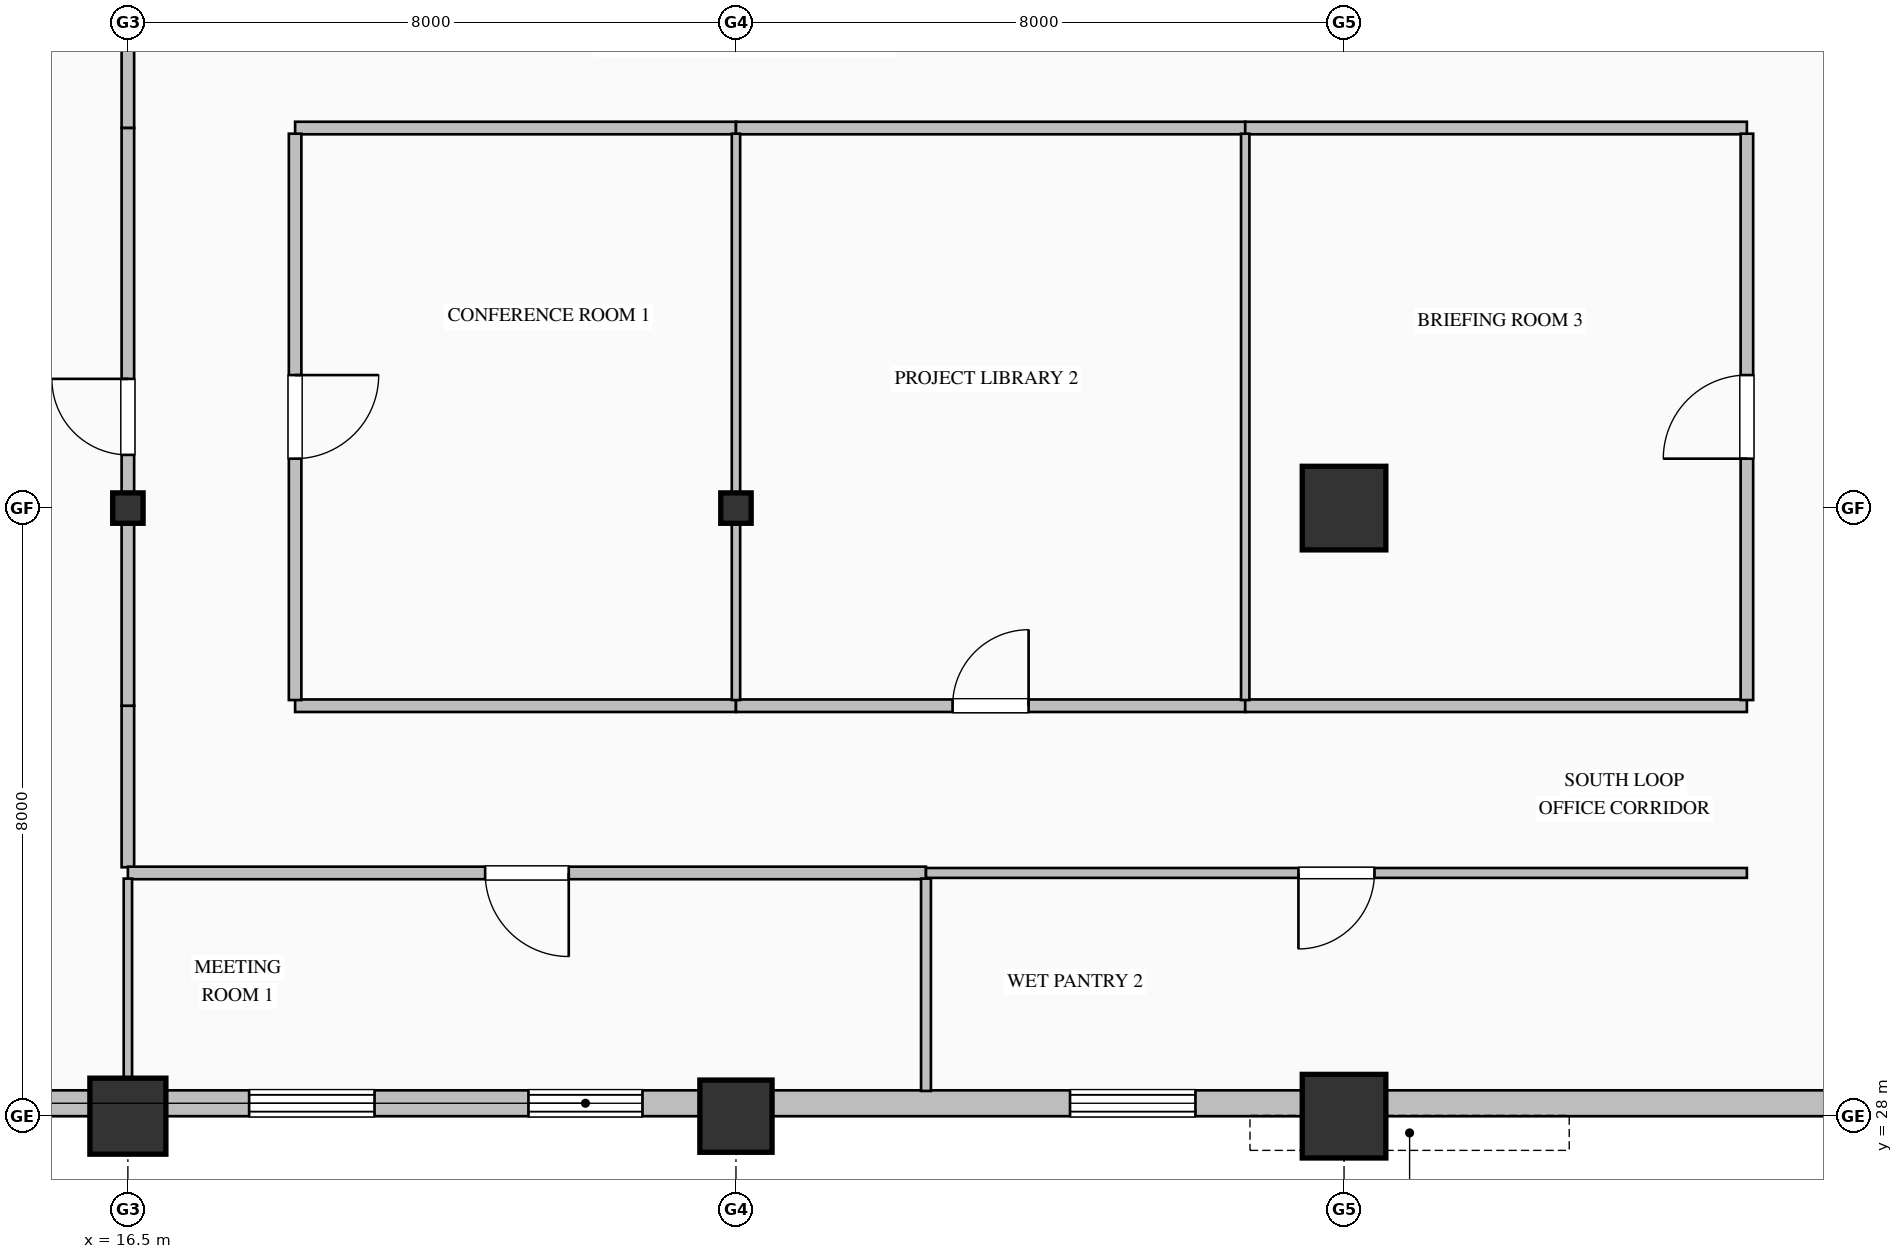
"""IFC4 building model, lengths in metres.
Left out: names, types, materials, properties, quantities, classifications, styles, units other than length and angle.
Written with IfcOpenShell. Run it as: python <this file> out.ifc"""

import sys

from ifc_helpers import new_model, si_unit, direction, frame, frame_2d, origin, origin_2d, place, context, subcontext, project, spatial, rectangle, hollow_rectangle, hollow_circle, i_section, extrude, element, fill, save


model = new_model("IFC4")
c1 = context("Model", 3, precision=1e-05, world=origin(), true_north=direction((0.0, 1.0)))
c2 = subcontext(c1, "Body", "Model", "MODEL_VIEW")
j1 = project(units=[si_unit("LENGTHUNIT", "METRE"), si_unit("PLANEANGLEUNIT", "RADIAN")], contexts=[c1])
p1 = place(None, origin())
s1 = spatial("IfcSite", under=j1, at=p1, CompositionType="ELEMENT")
p2 = place(p1, origin())
s2 = spatial("IfcBuilding", under=s1, at=p2, CompositionType="ELEMENT")
p3 = place(p2, frame((0.0, 0.0, 131.0)))
s3 = spatial("IfcBuildingStorey", under=s2, at=p3, CompositionType="ELEMENT", Elevation=131.0)
p4 = place(p3, frame((16.5, 28.0, 0.0), z_axis=(0.0, 0.0, 1.0), x_axis=(1.0, 0.0, 0.0)))
e1 = element("IfcColumn", 1, at=p4, inside=s3, PredefinedType="COLUMN", context=c2, shape_type="SweptSolid", body=[
    extrude(hollow_circle(Radius=0.5, WallThickness=0.036, at=origin_2d()), origin(), (0.0, 0.0, 1.0), 4.0),
])
p5 = place(p3, frame((16.5, 36.0, 0.0), z_axis=(0.0, 0.0, 1.0), x_axis=(1.0, 0.0, 0.0)))
e2 = element("IfcColumn", 2, at=p5, inside=s3, PredefinedType="COLUMN", context=c2, shape_type="SweptSolid", body=[
    extrude(i_section(OverallWidth=0.4, OverallDepth=0.4, WebThickness=0.013, FlangeThickness=0.021, FilletRadius=0.022, at=origin_2d()), origin(), (0.0, 0.0, 1.0), 4.0),
])
p6 = place(p3, frame((24.5, 28.0, 0.0), z_axis=(0.0, 0.0, 1.0), x_axis=(1.0, 0.0, 0.0)))
e3 = element("IfcColumn", 3, at=p6, inside=s3, PredefinedType="COLUMN", context=c2, shape_type="SweptSolid", body=[
    extrude(hollow_rectangle(XDim=0.95, YDim=0.95, WallThickness=0.036, at=origin_2d()), origin(), (0.0, 0.0, 1.0), 4.0),
])
p7 = place(p3, frame((24.5, 36.0, 0.0), z_axis=(0.0, 0.0, 1.0), x_axis=(1.0, 0.0, 0.0)))
e4 = element("IfcColumn", 4, at=p7, inside=s3, PredefinedType="COLUMN", context=c2, shape_type="SweptSolid", body=[
    extrude(i_section(OverallWidth=0.4, OverallDepth=0.4, WebThickness=0.013, FlangeThickness=0.021, FilletRadius=0.022, at=origin_2d()), origin(), (0.0, 0.0, 1.0), 4.0),
])
for number, where, z_axis, x_axis in (
    (5, (32.5, 28.0, 0.0), (0.0, 0.0, 1.0), (1.0, 0.0, 0.0)),
    (6, (32.5, 36.0, 0.0), (0.0, 0.0, 1.0), (1.0, 0.0, 0.0)),
):
    element("IfcColumn", number, at=place(p3, frame(where, z_axis=z_axis, x_axis=x_axis)), inside=s3, PredefinedType="COLUMN", context=c2, shape_type="SweptSolid", body=[
        extrude(hollow_rectangle(XDim=1.1, YDim=1.1, WallThickness=0.04, at=origin_2d()), origin(), (0.0, 0.0, 1.0), 4.0),
    ])
p8 = place(p3, frame((40.52, 28.17, 0.0), z_axis=(0.0, 0.0, 1.0), x_axis=(-1.0, 0.0, 0.0)))
e7 = element("IfcWall", 7, at=p8, inside=s3, PredefinedType="SOLIDWALL", context=c2, shape_type="SweptSolid", body=[
    extrude(rectangle(XDim=27.52, YDim=0.34, at=frame_2d((13.76, 0.0))), origin(), (0.0, 0.0, 1.0), 3.165),
])
p9 = place(p8, frame((9.975, 0.0, 0.85)))
e8 = element("IfcOpeningElement", 8, at=p9, cuts=e7, PredefinedType="OPENING", context=c2, shape_type="SweptSolid", body=[
    extrude(rectangle(XDim=1.65, YDim=1.95, at=frame_2d((0.825, 0.975))), frame((0.0, 0.18, 0.0), z_axis=(0.0, -1.0, 0.0), x_axis=(1.0, 0.0, 0.0)), (0.0, 0.0, 1.0), 0.36),
])
p10 = place(p8, frame((17.25, 0.0, 0.85)))
e9 = element("IfcOpeningElement", 9, at=p10, cuts=e7, PredefinedType="OPENING", context=c2, shape_type="SweptSolid", body=[
    extrude(rectangle(XDim=1.5, YDim=1.95, at=frame_2d((0.75, 0.975))), frame((0.0, 0.18, 0.0), z_axis=(0.0, -1.0, 0.0), x_axis=(1.0, 0.0, 0.0)), (0.0, 0.0, 1.0), 0.36),
])
p11 = place(p8, frame((20.775, 0.0, 0.85)))
e10 = element("IfcOpeningElement", 10, at=p11, cuts=e7, PredefinedType="OPENING", context=c2, shape_type="SweptSolid", body=[
    extrude(rectangle(XDim=1.65, YDim=1.95, at=frame_2d((0.825, 0.975))), frame((0.0, 0.18, 0.0), z_axis=(0.0, -1.0, 0.0), x_axis=(1.0, 0.0, 0.0)), (0.0, 0.0, 1.0), 0.36),
])
p12 = place(p3, frame((18.7, 33.4, 0.0), z_axis=(0.0, 0.0, 1.0), x_axis=(1.0, 0.0, 0.0)))
e11 = element("IfcWall", 11, at=p12, inside=s3, PredefinedType="PARTITIONING", context=c2, shape_type="SweptSolid", body=[
    extrude(rectangle(XDim=5.8, YDim=0.165, at=frame_2d((2.9, 0.0))), origin(), (0.0, 0.0, 1.0), 3.765),
])
p13 = place(p3, frame((24.5, 33.4, 0.0), z_axis=(0.0, 0.0, 1.0), x_axis=(1.0, 0.0, 0.0)))
e12 = element("IfcWall", 12, at=p13, inside=s3, PredefinedType="PARTITIONING", context=c2, shape_type="SweptSolid", body=[
    extrude(rectangle(XDim=6.7, YDim=0.165, at=frame_2d((3.35, 0.0))), origin(), (0.0, 0.0, 1.0), 3.765),
])
p14 = place(p13, frame((2.85, 0.0, 0.0)))
e13 = element("IfcOpeningElement", 13, at=p14, cuts=e12, PredefinedType="OPENING", context=c2, shape_type="SweptSolid", body=[
    extrude(rectangle(XDim=1.0, YDim=2.15, at=frame_2d((0.5, 1.075))), frame((0.0, 0.093, 0.0), z_axis=(0.0, -1.0, 0.0), x_axis=(1.0, 0.0, 0.0)), (0.0, 0.0, 1.0), 0.185),
])
p15 = place(p3, frame((31.2, 33.4, 0.0), z_axis=(0.0, 0.0, 1.0), x_axis=(1.0, 0.0, 0.0)))
e14 = element("IfcWall", 14, at=p15, inside=s3, PredefinedType="PARTITIONING", context=c2, shape_type="SweptSolid", body=[
    extrude(rectangle(XDim=6.6, YDim=0.165, at=frame_2d((3.3, 0.0))), origin(), (0.0, 0.0, 1.0), 3.765),
])
p16 = place(p3, frame((16.5, 31.274, 0.0), z_axis=(0.0, 0.0, 1.0), x_axis=(0.0, 1.0, 0.0)))
e15 = element("IfcWall", 15, at=p16, inside=s3, PredefinedType="PARTITIONING", context=c2, shape_type="SweptSolid", body=[
    extrude(rectangle(XDim=2.125, YDim=0.165, at=frame_2d((1.063, 0.0))), origin(), (0.0, 0.0, 1.0), 3.157),
])
p17 = place(p3, frame((27.0, 31.2, 0.0), z_axis=(0.0, 0.0, 1.0), x_axis=(-1.0, 0.0, 0.0)))
e16 = element("IfcWall", 16, at=p17, inside=s3, PredefinedType="PARTITIONING", context=c2, shape_type="SweptSolid", body=[
    extrude(rectangle(XDim=10.5, YDim=0.165, at=frame_2d((5.25, 0.0))), origin(), (0.0, 0.0, 1.0), 3.765),
])
p18 = place(p17, frame((4.7, 0.0, 0.0)))
e17 = element("IfcOpeningElement", 17, at=p18, cuts=e16, PredefinedType="OPENING", context=c2, shape_type="SweptSolid", body=[
    extrude(rectangle(XDim=1.1, YDim=2.2, at=frame_2d((0.55, 1.1))), frame((0.0, 0.093, 0.0), z_axis=(0.0, -1.0, 0.0), x_axis=(1.0, 0.0, 0.0)), (0.0, 0.0, 1.0), 0.185),
])
p19 = place(p3, frame((37.8, 31.2, 0.0), z_axis=(0.0, 0.0, 1.0), x_axis=(-1.0, 0.0, 0.0)))
e18 = element("IfcWall", 18, at=p19, inside=s3, PredefinedType="PARTITIONING", context=c2, shape_type="SweptSolid", body=[
    extrude(rectangle(XDim=10.8, YDim=0.13, at=frame_2d((5.4, 0.0))), origin(), (0.0, 0.0, 1.0), 3.765),
])
p20 = place(p19, frame((4.9, 0.0, 0.0)))
e19 = element("IfcOpeningElement", 19, at=p20, cuts=e18, PredefinedType="OPENING", context=c2, shape_type="SweptSolid", body=[
    extrude(rectangle(XDim=1.0, YDim=2.15, at=frame_2d((0.5, 1.075))), frame((0.0, 0.075, 0.0), z_axis=(0.0, -1.0, 0.0), x_axis=(1.0, 0.0, 0.0)), (0.0, 0.0, 1.0), 0.15),
])
p21 = place(p3, frame((24.5, 41.0, 0.0), z_axis=(0.0, 0.0, 1.0), x_axis=(-1.0, 0.0, 0.0)))
e20 = element("IfcWall", 20, at=p21, inside=s3, PredefinedType="PARTITIONING", context=c2, shape_type="SweptSolid", body=[
    extrude(rectangle(XDim=5.8, YDim=0.165, at=frame_2d((2.9, 0.0))), origin(), (0.0, 0.0, 1.0), 3.765),
])
p22 = place(p3, frame((31.2, 41.0, 0.0), z_axis=(0.0, 0.0, 1.0), x_axis=(-1.0, 0.0, 0.0)))
e21 = element("IfcWall", 21, at=p22, inside=s3, PredefinedType="PARTITIONING", context=c2, shape_type="SweptSolid", body=[
    extrude(rectangle(XDim=6.7, YDim=0.165, at=frame_2d((3.35, 0.0))), origin(), (0.0, 0.0, 1.0), 3.765),
])
p23 = place(p3, frame((37.8, 41.0, 0.0), z_axis=(0.0, 0.0, 1.0), x_axis=(-1.0, 0.0, 0.0)))
e22 = element("IfcWall", 22, at=p23, inside=s3, PredefinedType="PARTITIONING", context=c2, shape_type="SweptSolid", body=[
    extrude(rectangle(XDim=6.6, YDim=0.165, at=frame_2d((3.3, 0.0))), origin(), (0.0, 0.0, 1.0), 3.765),
])
p24 = place(p3, frame((16.5, 41.0, 0.0), z_axis=(0.0, 0.0, 1.0), x_axis=(0.0, 1.0, 0.0)))
e23 = element("IfcWall", 23, at=p24, inside=s3, PredefinedType="PARTITIONING", context=c2, shape_type="SweptSolid", body=[
    extrude(rectangle(XDim=2.125, YDim=0.165, at=frame_2d((1.063, 0.0))), origin(), (0.0, 0.0, 1.0), 3.157),
])
p25 = place(p3, frame((18.7, 40.926, 0.0), z_axis=(0.0, 0.0, 1.0), x_axis=(0.0, -1.0, 0.0)))
e24 = element("IfcWall", 24, at=p25, inside=s3, PredefinedType="PARTITIONING", context=c2, shape_type="SweptSolid", body=[
    extrude(rectangle(XDim=7.451, YDim=0.165, at=frame_2d((3.726, 0.0))), origin(), (0.0, 0.0, 1.0), 3.765),
])
p26 = place(p25, frame((3.176, 0.0, 0.0)))
e25 = element("IfcOpeningElement", 25, at=p26, cuts=e24, PredefinedType="OPENING", context=c2, shape_type="SweptSolid", body=[
    extrude(rectangle(XDim=1.1, YDim=2.2, at=frame_2d((0.55, 1.1))), frame((0.0, 0.093, 0.0), z_axis=(0.0, -1.0, 0.0), x_axis=(1.0, 0.0, 0.0)), (0.0, 0.0, 1.0), 0.185),
])
p27 = place(p3, frame((16.5, 33.4, 0.0), z_axis=(0.0, 0.0, 1.0), x_axis=(0.0, 1.0, 0.0)))
e26 = element("IfcWall", 26, at=p27, inside=s3, PredefinedType="PARTITIONING", context=c2, shape_type="SweptSolid", body=[
    extrude(rectangle(XDim=7.6, YDim=0.165, at=frame_2d((3.8, 0.0))), origin(), (0.0, 0.0, 1.0), 3.157),
])
p28 = place(p27, frame((3.3, 0.0, 0.0)))
e27 = element("IfcOpeningElement", 27, at=p28, cuts=e26, PredefinedType="OPENING", context=c2, shape_type="SweptSolid", body=[
    extrude(rectangle(XDim=1.0, YDim=2.15, at=frame_2d((0.5, 1.075))), frame((0.0, 0.093, 0.0), z_axis=(0.0, -1.0, 0.0), x_axis=(1.0, 0.0, 0.0)), (0.0, 0.0, 1.0), 0.185),
])
p29 = place(p3, frame((37.8, 33.475, 0.0), z_axis=(0.0, 0.0, 1.0), x_axis=(0.0, 1.0, 0.0)))
e28 = element("IfcWall", 28, at=p29, inside=s3, PredefinedType="PARTITIONING", context=c2, shape_type="SweptSolid", body=[
    extrude(rectangle(XDim=7.451, YDim=0.165, at=frame_2d((3.726, 0.0))), origin(), (0.0, 0.0, 1.0), 3.765),
])
p30 = place(p29, frame((3.176, 0.0, 0.0)))
e29 = element("IfcOpeningElement", 29, at=p30, cuts=e28, PredefinedType="OPENING", context=c2, shape_type="SweptSolid", body=[
    extrude(rectangle(XDim=1.1, YDim=2.2, at=frame_2d((0.55, 1.1))), frame((0.0, 0.093, 0.0), z_axis=(0.0, -1.0, 0.0), x_axis=(1.0, 0.0, 0.0)), (0.0, 0.0, 1.0), 0.185),
])
p31 = place(p3, frame((24.5, 40.926, 0.0), z_axis=(0.0, 0.0, 1.0), x_axis=(0.0, -1.0, 0.0)))
e30 = element("IfcWall", 30, at=p31, inside=s3, PredefinedType="MOVABLE", context=c2, shape_type="SweptSolid", body=[
    extrude(rectangle(XDim=7.451, YDim=0.11, at=frame_2d((3.726, 0.0))), origin(), (0.0, 0.0, 1.0), 3.157),
])
p32 = place(p3, frame((31.2, 40.926, 0.0), z_axis=(0.0, 0.0, 1.0), x_axis=(0.0, -1.0, 0.0)))
e31 = element("IfcWall", 31, at=p32, inside=s3, PredefinedType="MOVABLE", context=c2, shape_type="SweptSolid", body=[
    extrude(rectangle(XDim=7.451, YDim=0.11, at=frame_2d((3.726, 0.0))), origin(), (0.0, 0.0, 1.0), 3.765),
])
p33 = place(p3, frame((16.5, 31.125, 0.0), z_axis=(0.0, 0.0, 1.0), x_axis=(0.0, -1.0, 0.0)))
e32 = element("IfcWall", 32, at=p33, inside=s3, PredefinedType="MOVABLE", context=c2, shape_type="SweptSolid", body=[
    extrude(rectangle(XDim=2.793, YDim=0.11, at=frame_2d((1.397, 0.0))), origin(), (0.0, 0.0, 1.0), 3.157),
])
p34 = place(p3, frame((27.0, 31.125, 0.0), z_axis=(0.0, 0.0, 1.0), x_axis=(0.0, -1.0, 0.0)))
e33 = element("IfcWall", 33, at=p34, inside=s3, PredefinedType="PARTITIONING", context=c2, shape_type="SweptSolid", body=[
    extrude(rectangle(XDim=2.793, YDim=0.13, at=frame_2d((1.397, 0.0))), origin(), (0.0, 0.0, 1.0), 3.765),
])
p35 = place(p9, origin())
e34 = element("IfcWindow", 34, at=p35, inside=s3, PartitioningType="DOUBLE_PANEL_VERTICAL", PredefinedType="WINDOW", context=c2, shape_type="SweptSolid", body=[
    extrude(rectangle(XDim=1.65, YDim=1.95, at=frame_2d((0.825, 0.975))), frame((0.0, 0.15, 0.0), z_axis=(0.0, -1.0, 0.0), x_axis=(1.0, 0.0, 0.0)), (0.0, 0.0, 1.0), 0.06),
])
fill(e8, e34)
p36 = place(p10, origin())
e35 = element("IfcWindow", 35, at=p36, inside=s3, PartitioningType="DOUBLE_PANEL_VERTICAL", PredefinedType="WINDOW", context=c2, shape_type="SweptSolid", body=[
    extrude(rectangle(XDim=1.5, YDim=1.95, at=frame_2d((0.75, 0.975))), frame((0.0, 0.15, 0.0), z_axis=(0.0, -1.0, 0.0), x_axis=(1.0, 0.0, 0.0)), (0.0, 0.0, 1.0), 0.06),
])
fill(e9, e35)
p37 = place(p11, origin())
e36 = element("IfcWindow", 36, at=p37, inside=s3, PartitioningType="DOUBLE_PANEL_VERTICAL", PredefinedType="WINDOW", context=c2, shape_type="SweptSolid", body=[
    extrude(rectangle(XDim=1.65, YDim=1.95, at=frame_2d((0.825, 0.975))), frame((0.0, 0.15, 0.0), z_axis=(0.0, -1.0, 0.0), x_axis=(1.0, 0.0, 0.0)), (0.0, 0.0, 1.0), 0.06),
])
fill(e10, e36)
p38 = place(p26, origin())
e37 = element("IfcDoor", 37, at=p38, inside=s3, OperationType="SINGLE_SWING_LEFT", PredefinedType="DOOR", context=c2, shape_type="SweptSolid", body=[
    extrude(rectangle(XDim=1.1, YDim=2.2, at=frame_2d((0.55, 1.1))), frame((0.0, 0.025, 0.0), z_axis=(0.0, -1.0, 0.0), x_axis=(1.0, 0.0, 0.0)), (0.0, 0.0, 1.0), 0.05),
])
fill(e25, e37)
p39 = place(p14, origin())
e38 = element("IfcDoor", 38, at=p39, inside=s3, OperationType="SINGLE_SWING_RIGHT", PredefinedType="DOOR", context=c2, shape_type="SweptSolid", body=[
    extrude(rectangle(XDim=1.0, YDim=2.15, at=frame_2d((0.5, 1.075))), frame((0.0, 0.025, 0.0), z_axis=(0.0, -1.0, 0.0), x_axis=(1.0, 0.0, 0.0)), (0.0, 0.0, 1.0), 0.05),
])
fill(e13, e38)
p40 = place(p30, origin())
e39 = element("IfcDoor", 39, at=p40, inside=s3, OperationType="SINGLE_SWING_LEFT", PredefinedType="DOOR", context=c2, shape_type="SweptSolid", body=[
    extrude(rectangle(XDim=1.1, YDim=2.2, at=frame_2d((0.55, 1.1))), frame((0.0, 0.025, 0.0), z_axis=(0.0, -1.0, 0.0), x_axis=(1.0, 0.0, 0.0)), (0.0, 0.0, 1.0), 0.05),
])
fill(e29, e39)
p41 = place(p28, origin())
e40 = element("IfcDoor", 40, at=p41, inside=s3, OperationType="SINGLE_SWING_RIGHT", PredefinedType="DOOR", context=c2, shape_type="SweptSolid", body=[
    extrude(rectangle(XDim=1.0, YDim=2.15, at=frame_2d((0.5, 1.075))), frame((0.0, 0.025, 0.0), z_axis=(0.0, -1.0, 0.0), x_axis=(1.0, 0.0, 0.0)), (0.0, 0.0, 1.0), 0.05),
])
fill(e27, e40)
p42 = place(p18, origin())
e41 = element("IfcDoor", 41, at=p42, inside=s3, OperationType="SINGLE_SWING_LEFT", PredefinedType="DOOR", context=c2, shape_type="SweptSolid", body=[
    extrude(rectangle(XDim=1.1, YDim=2.2, at=frame_2d((0.55, 1.1))), frame((0.0, 0.025, 0.0), z_axis=(0.0, -1.0, 0.0), x_axis=(1.0, 0.0, 0.0)), (0.0, 0.0, 1.0), 0.05),
])
fill(e17, e41)
p43 = place(p20, origin())
e42 = element("IfcDoor", 42, at=p43, inside=s3, OperationType="SINGLE_SWING_RIGHT", PredefinedType="DOOR", context=c2, shape_type="SweptSolid", body=[
    extrude(rectangle(XDim=1.0, YDim=2.15, at=frame_2d((0.5, 1.075))), frame((0.0, 0.025, 0.0), z_axis=(0.0, -1.0, 0.0), x_axis=(1.0, 0.0, 0.0)), (0.0, 0.0, 1.0), 0.05),
])
fill(e19, e42)
save(model, sys.argv[1])
